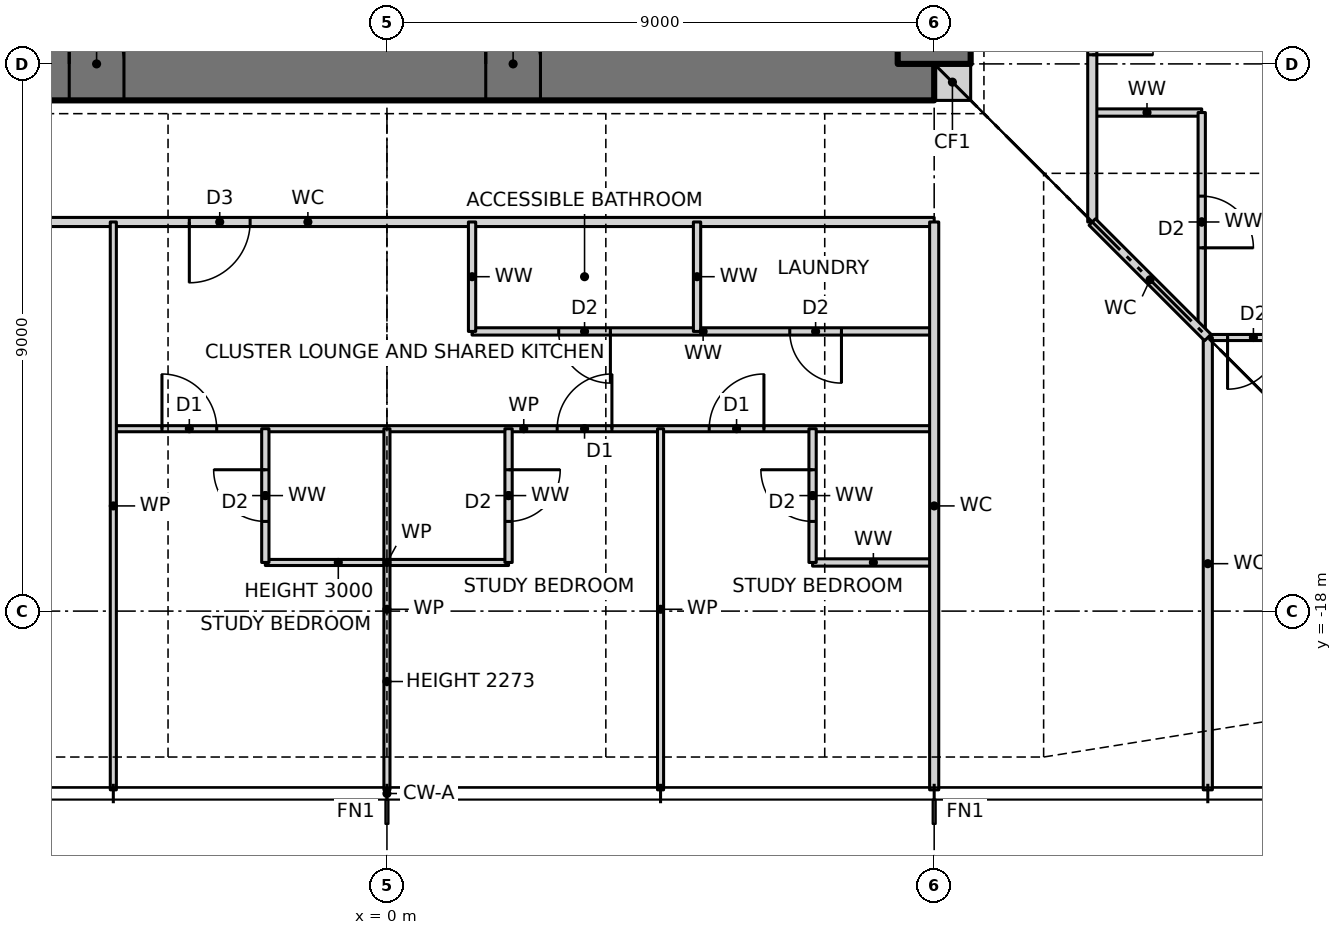
"""IFC4 building model, lengths in metres.
Left out: names, types, materials, properties, quantities, classifications, styles, units other than length and angle.
Written with IfcOpenShell. Run it as: python <this file> out.ifc"""

import sys

from ifc_helpers import new_model, si_unit, direction, frame, frame_2d, origin, place, context, subcontext, project, spatial, rectangle, extrude, element, fill, save


model = new_model("IFC4")
c1 = context("Model", 3, precision=1e-05, world=origin(), true_north=direction((0.0, 1.0)))
c2 = subcontext(c1, "Body", "Model", "MODEL_VIEW")
j1 = project(units=[si_unit("LENGTHUNIT", "METRE"), si_unit("PLANEANGLEUNIT", "RADIAN")], contexts=[c1])
p1 = place(None, origin())
s1 = spatial("IfcSite", under=j1, at=p1, CompositionType="ELEMENT")
p2 = place(p1, origin())
s2 = spatial("IfcBuilding", under=s1, at=p2, CompositionType="ELEMENT")
p3 = place(p2, frame((0.0, 0.0, 140.0)))
s3 = spatial("IfcBuildingStorey", under=s2, at=p3, CompositionType="ELEMENT", Elevation=140.0)
p4 = place(p3, frame((9.0, -9.3, 0.0), z_axis=(0.0, 0.0, 1.0), x_axis=(1.0, 0.0, 0.0)))
e1 = element("IfcWall", 1, at=p4, inside=s3, PredefinedType="SOLIDWALL", context=c2, shape_type="SweptSolid", body=[
    extrude(rectangle(XDim=0.6, YDim=0.6, at=frame_2d((0.3, 0.0))), origin(), (0.0, 0.0, 1.0), 3.5),
])
p5 = place(p3, frame((-9.0, -9.0, 0.0), z_axis=(0.0, 0.0, 1.0), x_axis=(1.0, 0.0, 0.0)))
e2 = element("IfcWall", 2, at=p5, inside=s3, PredefinedType="SHEAR", context=c2, shape_type="SweptSolid", body=[
    extrude(rectangle(XDim=18.0, YDim=1.2, at=frame_2d((9.0, 0.0))), origin(), (0.0, 0.0, 1.0), 3.5),
])
p6 = place(p5, frame((3.775, 0.0, 0.0)))
e3 = element("IfcOpeningElement", 3, at=p6, cuts=e2, PredefinedType="OPENING", context=c2, shape_type="SweptSolid", body=[
    extrude(rectangle(XDim=0.9, YDim=2.1, at=frame_2d((0.45, 1.05))), frame((0.0, 0.61, 0.0), z_axis=(0.0, -1.0, 0.0), x_axis=(1.0, 0.0, 0.0)), (0.0, 0.0, 1.0), 1.22),
])
p7 = place(p5, frame((10.625, 0.0, 0.0)))
e4 = element("IfcOpeningElement", 4, at=p7, cuts=e2, PredefinedType="OPENING", context=c2, shape_type="SweptSolid", body=[
    extrude(rectangle(XDim=0.9, YDim=2.1, at=frame_2d((0.45, 1.05))), frame((0.0, 0.61, 0.0), z_axis=(0.0, -1.0, 0.0), x_axis=(1.0, 0.0, 0.0)), (0.0, 0.0, 1.0), 1.22),
])
p8 = place(p3, frame((9.0, -9.0, 0.0), z_axis=(0.0, 0.0, 1.0), x_axis=(0.0, 1.0, 0.0)))
e5 = element("IfcWall", 5, at=p8, inside=s3, PredefinedType="SHEAR", context=c2, shape_type="SweptSolid", body=[
    extrude(rectangle(XDim=18.0, YDim=1.2, at=frame_2d((9.0, 0.0))), origin(), (0.0, 0.0, 1.0), 3.5),
])
p9 = place(p8, frame((8.5, 0.0, 0.0)))
e6 = element("IfcOpeningElement", 6, at=p9, cuts=e5, PredefinedType="OPENING", context=c2, shape_type="SweptSolid", body=[
    extrude(rectangle(XDim=1.0, YDim=2.1, at=frame_2d((0.5, 1.05))), frame((0.0, 0.61, 0.0), z_axis=(0.0, -1.0, 0.0), x_axis=(1.0, 0.0, 0.0)), (0.0, 0.0, 1.0), 1.22),
])
p10 = place(p3, frame((-2.0, -17.2, 0.0), z_axis=(0.0, 0.0, 1.0), x_axis=(1.0, 0.0, 0.0)))
e7 = element("IfcWall", 7, at=p10, inside=s3, PredefinedType="PARTITIONING", context=c2, shape_type="SweptSolid", body=[
    extrude(rectangle(XDim=4.0, YDim=0.1, at=frame_2d((2.0, 0.0))), origin(), (0.0, 0.0, 1.0), 3.0),
])
p11 = place(p3, frame((7.0, -17.2, 0.0), z_axis=(0.0, 0.0, 1.0), x_axis=(1.0, 0.0, 0.0)))
e8 = element("IfcWall", 8, at=p11, inside=s3, PredefinedType="PARTITIONING", context=c2, shape_type="SweptSolid", body=[
    extrude(rectangle(XDim=2.0, YDim=0.12, at=frame_2d((1.0, 0.0))), origin(), (0.0, 0.0, 1.0), 3.2),
])
p12 = place(p3, frame((-4.5, -15.0, 0.0), z_axis=(0.0, 0.0, 1.0), x_axis=(1.0, 0.0, 0.0)))
e9 = element("IfcWall", 9, at=p12, inside=s3, PredefinedType="PARTITIONING", context=c2, shape_type="SweptSolid", body=[
    extrude(rectangle(XDim=13.5, YDim=0.1, at=frame_2d((6.75, 0.0))), origin(), (0.0, 0.0, 1.0), 3.2),
])
p13 = place(p12, frame((0.8, 0.0, 0.0)))
e10 = element("IfcOpeningElement", 10, at=p13, cuts=e9, PredefinedType="OPENING", context=c2, shape_type="SweptSolid", body=[
    extrude(rectangle(XDim=0.9, YDim=2.1, at=frame_2d((0.45, 1.05))), frame((0.0, 0.06, 0.0), z_axis=(0.0, -1.0, 0.0), x_axis=(1.0, 0.0, 0.0)), (0.0, 0.0, 1.0), 0.12),
])
p14 = place(p12, frame((7.3, 0.0, 0.0)))
e11 = element("IfcOpeningElement", 11, at=p14, cuts=e9, PredefinedType="OPENING", context=c2, shape_type="SweptSolid", body=[
    extrude(rectangle(XDim=0.9, YDim=2.1, at=frame_2d((0.45, 1.05))), frame((0.0, 0.06, 0.0), z_axis=(0.0, -1.0, 0.0), x_axis=(1.0, 0.0, 0.0)), (0.0, 0.0, 1.0), 0.12),
])
p15 = place(p12, frame((9.8, 0.0, 0.0)))
e12 = element("IfcOpeningElement", 12, at=p15, cuts=e9, PredefinedType="OPENING", context=c2, shape_type="SweptSolid", body=[
    extrude(rectangle(XDim=0.9, YDim=2.1, at=frame_2d((0.45, 1.05))), frame((0.0, 0.06, 0.0), z_axis=(0.0, -1.0, 0.0), x_axis=(1.0, 0.0, 0.0)), (0.0, 0.0, 1.0), 0.12),
])
p16 = place(p3, frame((13.5, -13.5, 0.0), z_axis=(0.0, 0.0, 1.0), x_axis=(1.0, 0.0, 0.0)))
e13 = element("IfcWall", 13, at=p16, inside=s3, PredefinedType="PARTITIONING", context=c2, shape_type="SweptSolid", body=[
    extrude(rectangle(XDim=7.44, YDim=0.1, at=frame_2d((3.72, 0.0))), origin(), (0.0, 0.0, 1.0), 3.2),
])
p17 = place(p16, frame((0.325, 0.0, 0.0)))
e14 = element("IfcOpeningElement", 14, at=p17, cuts=e13, PredefinedType="OPENING", context=c2, shape_type="SweptSolid", body=[
    extrude(rectangle(XDim=0.85, YDim=2.1, at=frame_2d((0.425, 1.05))), frame((0.0, 0.06, 0.0), z_axis=(0.0, -1.0, 0.0), x_axis=(1.0, 0.0, 0.0)), (0.0, 0.0, 1.0), 0.12),
])
p18 = place(p3, frame((1.4, -13.4, 0.0), z_axis=(0.0, 0.0, 1.0), x_axis=(1.0, 0.0, 0.0)))
e15 = element("IfcWall", 15, at=p18, inside=s3, PredefinedType="PARTITIONING", context=c2, shape_type="SweptSolid", body=[
    extrude(rectangle(XDim=7.6, YDim=0.12, at=frame_2d((3.8, 0.0))), origin(), (0.0, 0.0, 1.0), 3.2),
])
p19 = place(p18, frame((1.425, 0.0, 0.0)))
e16 = element("IfcOpeningElement", 16, at=p19, cuts=e15, PredefinedType="OPENING", context=c2, shape_type="SweptSolid", body=[
    extrude(rectangle(XDim=0.85, YDim=2.1, at=frame_2d((0.425, 1.05))), frame((0.0, 0.07, 0.0), z_axis=(0.0, -1.0, 0.0), x_axis=(1.0, 0.0, 0.0)), (0.0, 0.0, 1.0), 0.14),
])
p20 = place(p18, frame((5.225, 0.0, 0.0)))
e17 = element("IfcOpeningElement", 17, at=p20, cuts=e15, PredefinedType="OPENING", context=c2, shape_type="SweptSolid", body=[
    extrude(rectangle(XDim=0.85, YDim=2.1, at=frame_2d((0.425, 1.05))), frame((0.0, 0.07, 0.0), z_axis=(0.0, -1.0, 0.0), x_axis=(1.0, 0.0, 0.0)), (0.0, 0.0, 1.0), 0.14),
])
p21 = place(p3, frame((-11.6, -11.6, 0.0), z_axis=(0.0, 0.0, 1.0), x_axis=(1.0, 0.0, 0.0)))
e18 = element("IfcWall", 18, at=p21, inside=s3, PredefinedType="PARTITIONING", context=c2, shape_type="SweptSolid", body=[
    extrude(rectangle(XDim=20.6, YDim=0.15, at=frame_2d((10.3, 0.0))), origin(), (0.0, 0.0, 1.0), 3.2),
])
p22 = place(p21, frame((2.65, 0.0, 0.0)))
e19 = element("IfcOpeningElement", 19, at=p22, cuts=e18, PredefinedType="OPENING", context=c2, shape_type="SweptSolid", body=[
    extrude(rectangle(XDim=1.8, YDim=2.1, at=frame_2d((0.9, 1.05))), frame((0.0, 0.085, 0.0), z_axis=(0.0, -1.0, 0.0), x_axis=(1.0, 0.0, 0.0)), (0.0, 0.0, 1.0), 0.17),
])
p23 = place(p21, frame((8.35, 0.0, 0.0)))
e20 = element("IfcOpeningElement", 20, at=p23, cuts=e18, PredefinedType="OPENING", context=c2, shape_type="SweptSolid", body=[
    extrude(rectangle(XDim=1.0, YDim=2.1, at=frame_2d((0.5, 1.05))), frame((0.0, 0.085, 0.0), z_axis=(0.0, -1.0, 0.0), x_axis=(1.0, 0.0, 0.0)), (0.0, 0.0, 1.0), 0.17),
])
p24 = place(p3, frame((11.6, -9.8, 0.0), z_axis=(0.0, 0.0, 1.0), x_axis=(1.0, 0.0, 0.0)))
e21 = element("IfcWall", 21, at=p24, inside=s3, PredefinedType="PARTITIONING", context=c2, shape_type="SweptSolid", body=[
    extrude(rectangle(XDim=1.8, YDim=0.12, at=frame_2d((0.9, 0.0))), origin(), (0.0, 0.0, 1.0), 3.2),
])
p25 = place(p3, frame((13.5, -20.94, 0.0), z_axis=(0.0, 0.0, 1.0), x_axis=(0.0, 1.0, 0.0)))
e22 = element("IfcWall", 22, at=p25, inside=s3, PredefinedType="PARTITIONING", context=c2, shape_type="SweptSolid", body=[
    extrude(rectangle(XDim=7.44, YDim=0.15, at=frame_2d((3.72, 0.0))), origin(), (0.0, 0.0, 1.0), 3.2),
])
p26 = place(p3, frame((13.4, -13.4, 0.0), z_axis=(0.0, 0.0, 1.0), x_axis=(0.0, 1.0, 0.0)))
e23 = element("IfcWall", 23, at=p26, inside=s3, PredefinedType="PARTITIONING", context=c2, shape_type="SweptSolid", body=[
    extrude(rectangle(XDim=3.6, YDim=0.12, at=frame_2d((1.8, 0.0))), origin(), (0.0, 0.0, 1.0), 3.2),
])
p27 = place(p26, frame((1.375, 0.0, 0.0)))
e24 = element("IfcOpeningElement", 24, at=p27, cuts=e23, PredefinedType="OPENING", context=c2, shape_type="SweptSolid", body=[
    extrude(rectangle(XDim=0.85, YDim=2.1, at=frame_2d((0.425, 1.05))), frame((0.0, 0.07, 0.0), z_axis=(0.0, -1.0, 0.0), x_axis=(1.0, 0.0, 0.0)), (0.0, 0.0, 1.0), 0.14),
])
p28 = place(p3, frame((11.6, -11.6, 0.0), z_axis=(0.0, 0.0, 1.0), x_axis=(0.0, 1.0, 0.0)))
e25 = element("IfcWall", 25, at=p28, inside=s3, PredefinedType="PARTITIONING", context=c2, shape_type="SweptSolid", body=[
    extrude(rectangle(XDim=20.6, YDim=0.15, at=frame_2d((10.3, 0.0))), origin(), (0.0, 0.0, 1.0), 3.2),
])
p29 = place(p28, frame((2.75, 0.0, 0.0)))
e26 = element("IfcOpeningElement", 26, at=p29, cuts=e25, PredefinedType="OPENING", context=c2, shape_type="SweptSolid", body=[
    extrude(rectangle(XDim=1.0, YDim=2.1, at=frame_2d((0.5, 1.05))), frame((0.0, 0.085, 0.0), z_axis=(0.0, -1.0, 0.0), x_axis=(1.0, 0.0, 0.0)), (0.0, 0.0, 1.0), 0.17),
])
p30 = place(p28, frame((8.35, 0.0, 0.0)))
e27 = element("IfcOpeningElement", 27, at=p30, cuts=e25, PredefinedType="OPENING", context=c2, shape_type="SweptSolid", body=[
    extrude(rectangle(XDim=1.0, YDim=2.1, at=frame_2d((0.5, 1.05))), frame((0.0, 0.085, 0.0), z_axis=(0.0, -1.0, 0.0), x_axis=(1.0, 0.0, 0.0)), (0.0, 0.0, 1.0), 0.17),
])
p31 = place(p3, frame((9.0, -20.94, 0.0), z_axis=(0.0, 0.0, 1.0), x_axis=(0.0, 1.0, 0.0)))
e28 = element("IfcWall", 28, at=p31, inside=s3, PredefinedType="PARTITIONING", context=c2, shape_type="SweptSolid", body=[
    extrude(rectangle(XDim=9.34, YDim=0.15, at=frame_2d((4.67, 0.0))), origin(), (0.0, 0.0, 1.0), 3.2),
])
p32 = place(p3, frame((7.0, -17.2, 0.0), z_axis=(0.0, 0.0, 1.0), x_axis=(0.0, 1.0, 0.0)))
e29 = element("IfcWall", 29, at=p32, inside=s3, PredefinedType="PARTITIONING", context=c2, shape_type="SweptSolid", body=[
    extrude(rectangle(XDim=2.2, YDim=0.12, at=frame_2d((1.1, 0.0))), origin(), (0.0, 0.0, 1.0), 3.2),
])
p33 = place(p32, frame((0.675, 0.0, 0.0)))
e30 = element("IfcOpeningElement", 30, at=p33, cuts=e29, PredefinedType="OPENING", context=c2, shape_type="SweptSolid", body=[
    extrude(rectangle(XDim=0.85, YDim=2.1, at=frame_2d((0.425, 1.05))), frame((0.0, 0.07, 0.0), z_axis=(0.0, -1.0, 0.0), x_axis=(1.0, 0.0, 0.0)), (0.0, 0.0, 1.0), 0.14),
])
p34 = place(p3, frame((5.1, -13.4, 0.0), z_axis=(0.0, 0.0, 1.0), x_axis=(0.0, 1.0, 0.0)))
e31 = element("IfcWall", 31, at=p34, inside=s3, PredefinedType="PARTITIONING", context=c2, shape_type="SweptSolid", body=[
    extrude(rectangle(XDim=1.8, YDim=0.12, at=frame_2d((0.9, 0.0))), origin(), (0.0, 0.0, 1.0), 3.2),
])
p35 = place(p3, frame((4.5, -20.94, 0.0), z_axis=(0.0, 0.0, 1.0), x_axis=(0.0, 1.0, 0.0)))
e32 = element("IfcWall", 32, at=p35, inside=s3, PredefinedType="PARTITIONING", context=c2, shape_type="SweptSolid", body=[
    extrude(rectangle(XDim=5.94, YDim=0.1, at=frame_2d((2.97, 0.0))), origin(), (0.0, 0.0, 1.0), 3.2),
])
p36 = place(p3, frame((2.0, -17.2, 0.0), z_axis=(0.0, 0.0, 1.0), x_axis=(0.0, 1.0, 0.0)))
e33 = element("IfcWall", 33, at=p36, inside=s3, PredefinedType="PARTITIONING", context=c2, shape_type="SweptSolid", body=[
    extrude(rectangle(XDim=2.2, YDim=0.12, at=frame_2d((1.1, 0.0))), origin(), (0.0, 0.0, 1.0), 3.2),
])
p37 = place(p36, frame((0.675, 0.0, 0.0)))
e34 = element("IfcOpeningElement", 34, at=p37, cuts=e33, PredefinedType="OPENING", context=c2, shape_type="SweptSolid", body=[
    extrude(rectangle(XDim=0.85, YDim=2.1, at=frame_2d((0.425, 1.05))), frame((0.0, 0.07, 0.0), z_axis=(0.0, -1.0, 0.0), x_axis=(1.0, 0.0, 0.0)), (0.0, 0.0, 1.0), 0.14),
])
p38 = place(p3, frame((1.4, -13.4, 0.0), z_axis=(0.0, 0.0, 1.0), x_axis=(0.0, 1.0, 0.0)))
e35 = element("IfcWall", 35, at=p38, inside=s3, PredefinedType="PARTITIONING", context=c2, shape_type="SweptSolid", body=[
    extrude(rectangle(XDim=1.8, YDim=0.12, at=frame_2d((0.9, 0.0))), origin(), (0.0, 0.0, 1.0), 3.2),
])
p39 = place(p3, frame((0.0, -20.94, 0.0), z_axis=(0.0, 0.0, 1.0), x_axis=(0.0, 1.0, 0.0)))
e36 = element("IfcWall", 36, at=p39, inside=s3, PredefinedType="PARTITIONING", context=c2, shape_type="SweptSolid", body=[
    extrude(rectangle(XDim=5.94, YDim=0.1, at=frame_2d((2.97, 0.0))), origin(), (0.0, 0.0, 1.0), 2.273),
])
p40 = place(p3, frame((-2.0, -17.2, 0.0), z_axis=(0.0, 0.0, 1.0), x_axis=(0.0, 1.0, 0.0)))
e37 = element("IfcWall", 37, at=p40, inside=s3, PredefinedType="PARTITIONING", context=c2, shape_type="SweptSolid", body=[
    extrude(rectangle(XDim=2.2, YDim=0.12, at=frame_2d((1.1, 0.0))), origin(), (0.0, 0.0, 1.0), 3.2),
])
p41 = place(p40, frame((0.675, 0.0, 0.0)))
e38 = element("IfcOpeningElement", 38, at=p41, cuts=e37, PredefinedType="OPENING", context=c2, shape_type="SweptSolid", body=[
    extrude(rectangle(XDim=0.85, YDim=2.1, at=frame_2d((0.425, 1.05))), frame((0.0, 0.07, 0.0), z_axis=(0.0, -1.0, 0.0), x_axis=(1.0, 0.0, 0.0)), (0.0, 0.0, 1.0), 0.14),
])
p42 = place(p3, frame((-4.5, -20.94, 0.0), z_axis=(0.0, 0.0, 1.0), x_axis=(0.0, 1.0, 0.0)))
e39 = element("IfcWall", 39, at=p42, inside=s3, PredefinedType="PARTITIONING", context=c2, shape_type="SweptSolid", body=[
    extrude(rectangle(XDim=9.34, YDim=0.1, at=frame_2d((4.67, 0.0))), origin(), (0.0, 0.0, 1.0), 3.2),
])
p43 = place(p3, frame((13.5, -13.5, 0.0), z_axis=(0.0, 0.0, 1.0), x_axis=(-0.707106781187, 0.707106781187, 0.0)))
e40 = element("IfcWall", 40, at=p43, inside=s3, PredefinedType="PARTITIONING", context=c2, shape_type="SweptSolid", body=[
    extrude(rectangle(XDim=2.687, YDim=0.15, at=frame_2d((1.343, 0.0))), origin(), (0.0, 0.0, 1.0), 3.2),
])
p44 = place(p41, origin())
e41 = element("IfcDoor", 41, at=p44, inside=s3, OperationType="SINGLE_SWING_RIGHT", PredefinedType="DOOR", context=c2, shape_type="SweptSolid", body=[
    extrude(rectangle(XDim=0.85, YDim=2.1, at=frame_2d((0.425, 1.05))), frame((0.0, 0.025, 0.0), z_axis=(0.0, -1.0, 0.0), x_axis=(1.0, 0.0, 0.0)), (0.0, 0.0, 1.0), 0.05),
])
fill(e38, e41)
p45 = place(p13, origin())
e42 = element("IfcDoor", 42, at=p45, inside=s3, OperationType="SINGLE_SWING_LEFT", PredefinedType="DOOR", context=c2, shape_type="SweptSolid", body=[
    extrude(rectangle(XDim=0.9, YDim=2.1, at=frame_2d((0.45, 1.05))), frame((0.0, 0.025, 0.0), z_axis=(0.0, -1.0, 0.0), x_axis=(1.0, 0.0, 0.0)), (0.0, 0.0, 1.0), 0.05),
])
fill(e10, e42)
p46 = place(p37, frame((0.85, 0.0, 0.0), z_axis=(0.0, 0.0, 1.0), x_axis=(-1.0, 0.0, 0.0)))
e43 = element("IfcDoor", 43, at=p46, inside=s3, OperationType="SINGLE_SWING_LEFT", PredefinedType="DOOR", context=c2, shape_type="SweptSolid", body=[
    extrude(rectangle(XDim=0.85, YDim=2.1, at=frame_2d((0.425, 1.05))), frame((0.0, 0.025, 0.0), z_axis=(0.0, -1.0, 0.0), x_axis=(1.0, 0.0, 0.0)), (0.0, 0.0, 1.0), 0.05),
])
fill(e34, e43)
p47 = place(p14, origin())
e44 = element("IfcDoor", 44, at=p47, inside=s3, OperationType="SINGLE_SWING_RIGHT", PredefinedType="DOOR", context=c2, shape_type="SweptSolid", body=[
    extrude(rectangle(XDim=0.9, YDim=2.1, at=frame_2d((0.45, 1.05))), frame((0.0, 0.025, 0.0), z_axis=(0.0, -1.0, 0.0), x_axis=(1.0, 0.0, 0.0)), (0.0, 0.0, 1.0), 0.05),
])
fill(e11, e44)
p48 = place(p33, origin())
e45 = element("IfcDoor", 45, at=p48, inside=s3, OperationType="SINGLE_SWING_RIGHT", PredefinedType="DOOR", context=c2, shape_type="SweptSolid", body=[
    extrude(rectangle(XDim=0.85, YDim=2.1, at=frame_2d((0.425, 1.05))), frame((0.0, 0.025, 0.0), z_axis=(0.0, -1.0, 0.0), x_axis=(1.0, 0.0, 0.0)), (0.0, 0.0, 1.0), 0.05),
])
fill(e30, e45)
p49 = place(p15, origin())
e46 = element("IfcDoor", 46, at=p49, inside=s3, OperationType="SINGLE_SWING_RIGHT", PredefinedType="DOOR", context=c2, shape_type="SweptSolid", body=[
    extrude(rectangle(XDim=0.9, YDim=2.1, at=frame_2d((0.45, 1.05))), frame((0.0, 0.025, 0.0), z_axis=(0.0, -1.0, 0.0), x_axis=(1.0, 0.0, 0.0)), (0.0, 0.0, 1.0), 0.05),
])
fill(e12, e46)
p50 = place(p23, frame((1.0, 0.0, 0.0), z_axis=(0.0, 0.0, 1.0), x_axis=(-1.0, 0.0, 0.0)))
e47 = element("IfcDoor", 47, at=p50, inside=s3, OperationType="SINGLE_SWING_RIGHT", PredefinedType="DOOR", context=c2, shape_type="SweptSolid", body=[
    extrude(rectangle(XDim=1.0, YDim=2.1, at=frame_2d((0.5, 1.05))), frame((0.0, 0.025, 0.0), z_axis=(0.0, -1.0, 0.0), x_axis=(1.0, 0.0, 0.0)), (0.0, 0.0, 1.0), 0.05),
])
fill(e20, e47)
p51 = place(p19, frame((0.85, 0.0, 0.0), z_axis=(0.0, 0.0, 1.0), x_axis=(-1.0, 0.0, 0.0)))
e48 = element("IfcDoor", 48, at=p51, inside=s3, OperationType="SINGLE_SWING_LEFT", PredefinedType="DOOR", context=c2, shape_type="SweptSolid", body=[
    extrude(rectangle(XDim=0.85, YDim=2.1, at=frame_2d((0.425, 1.05))), frame((0.0, 0.025, 0.0), z_axis=(0.0, -1.0, 0.0), x_axis=(1.0, 0.0, 0.0)), (0.0, 0.0, 1.0), 0.05),
])
fill(e16, e48)
p52 = place(p20, frame((0.85, 0.0, 0.0), z_axis=(0.0, 0.0, 1.0), x_axis=(-1.0, 0.0, 0.0)))
e49 = element("IfcDoor", 49, at=p52, inside=s3, OperationType="SINGLE_SWING_LEFT", PredefinedType="DOOR", context=c2, shape_type="SweptSolid", body=[
    extrude(rectangle(XDim=0.85, YDim=2.1, at=frame_2d((0.425, 1.05))), frame((0.0, 0.025, 0.0), z_axis=(0.0, -1.0, 0.0), x_axis=(1.0, 0.0, 0.0)), (0.0, 0.0, 1.0), 0.05),
])
fill(e17, e49)
p53 = place(p29, frame((1.0, 0.0, 0.0), z_axis=(0.0, 0.0, 1.0), x_axis=(-1.0, 0.0, 0.0)))
e50 = element("IfcDoor", 50, at=p53, inside=s3, OperationType="SINGLE_SWING_RIGHT", PredefinedType="DOOR", context=c2, shape_type="SweptSolid", body=[
    extrude(rectangle(XDim=1.0, YDim=2.1, at=frame_2d((0.5, 1.05))), frame((0.0, 0.025, 0.0), z_axis=(0.0, -1.0, 0.0), x_axis=(1.0, 0.0, 0.0)), (0.0, 0.0, 1.0), 0.05),
])
fill(e26, e50)
p54 = place(p27, frame((0.85, 0.0, 0.0), z_axis=(0.0, 0.0, 1.0), x_axis=(-1.0, 0.0, 0.0)))
e51 = element("IfcDoor", 51, at=p54, inside=s3, OperationType="SINGLE_SWING_RIGHT", PredefinedType="DOOR", context=c2, shape_type="SweptSolid", body=[
    extrude(rectangle(XDim=0.85, YDim=2.1, at=frame_2d((0.425, 1.05))), frame((0.0, 0.025, 0.0), z_axis=(0.0, -1.0, 0.0), x_axis=(1.0, 0.0, 0.0)), (0.0, 0.0, 1.0), 0.05),
])
fill(e24, e51)
p55 = place(p17, frame((0.85, 0.0, 0.0), z_axis=(0.0, 0.0, 1.0), x_axis=(-1.0, 0.0, 0.0)))
e52 = element("IfcDoor", 52, at=p55, inside=s3, OperationType="SINGLE_SWING_RIGHT", PredefinedType="DOOR", context=c2, shape_type="SweptSolid", body=[
    extrude(rectangle(XDim=0.85, YDim=2.1, at=frame_2d((0.425, 1.05))), frame((0.0, 0.025, 0.0), z_axis=(0.0, -1.0, 0.0), x_axis=(1.0, 0.0, 0.0)), (0.0, 0.0, 1.0), 0.05),
])
fill(e14, e52)
p56 = place(p6, origin())
e53 = element("IfcDoor", 53, at=p56, inside=s3, OperationType="SINGLE_SWING_LEFT", PredefinedType="DOOR", context=c2, shape_type="SweptSolid", body=[
    extrude(rectangle(XDim=0.9, YDim=2.1, at=frame_2d((0.45, 1.05))), frame((0.0, 0.025, 0.0), z_axis=(0.0, -1.0, 0.0), x_axis=(1.0, 0.0, 0.0)), (0.0, 0.0, 1.0), 0.05),
])
fill(e3, e53)
p57 = place(p7, origin())
e54 = element("IfcDoor", 54, at=p57, inside=s3, OperationType="SINGLE_SWING_LEFT", PredefinedType="DOOR", context=c2, shape_type="SweptSolid", body=[
    extrude(rectangle(XDim=0.9, YDim=2.1, at=frame_2d((0.45, 1.05))), frame((0.0, 0.025, 0.0), z_axis=(0.0, -1.0, 0.0), x_axis=(1.0, 0.0, 0.0)), (0.0, 0.0, 1.0), 0.05),
])
fill(e4, e54)
save(model, sys.argv[1])
